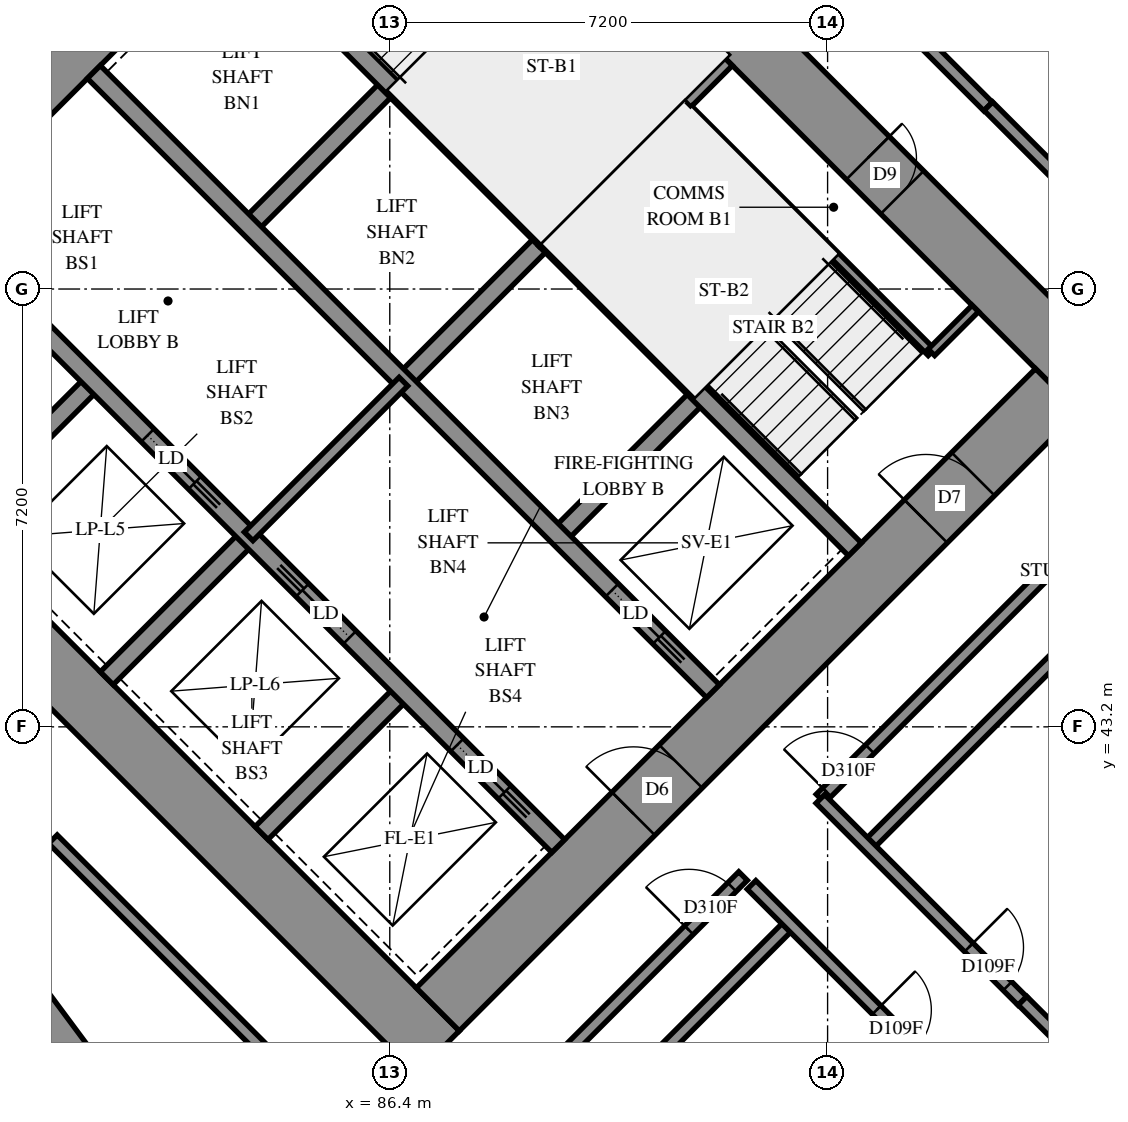
"""IFC4 building model, lengths in metres.
Left out: names, types, materials, properties, quantities, classifications, styles, units other than length and angle.
Written with IfcOpenShell. Run it as: python <this file> out.ifc"""

import sys

from ifc_helpers import new_model, si_unit, direction, frame, frame_2d, origin, place, context, subcontext, project, spatial, polyline, rectangle, outline, extrude, element, fill, save


model = new_model("IFC4")
c1 = context("Model", 3, precision=1e-05, world=origin(), true_north=direction((0.0, 1.0)))
c2 = subcontext(c1, "Body", "Model", "MODEL_VIEW")
j1 = project(units=[si_unit("LENGTHUNIT", "METRE"), si_unit("PLANEANGLEUNIT", "RADIAN")], contexts=[c1])
p1 = place(None, origin())
s1 = spatial("IfcSite", under=j1, at=p1, CompositionType="ELEMENT")
p2 = place(p1, origin())
s2 = spatial("IfcBuilding", under=s1, at=p2, CompositionType="ELEMENT")
p3 = place(p2, frame((0.0, 0.0, 57.6)))
s3 = spatial("IfcBuildingStorey", under=s2, at=p3, CompositionType="ELEMENT", Elevation=57.6)
p4 = place(p3, frame((75.594, 49.443, -0.3), z_axis=(0.0, 0.0, 1.0), x_axis=(0.7071037324, -0.70710983, 0.0)))
e1 = element("IfcWall", 1, at=p4, inside=s3, PredefinedType="SHEAR", context=c2, shape_type="SweptSolid", body=[
    extrude(rectangle(XDim=16.4, YDim=1.0, at=frame_2d((8.2, 0.0))), origin(), (0.0, 0.0, 1.0), 2.7),
])
p5 = place(p3, frame((86.483, 60.333, -0.3), z_axis=(0.0, 0.0, 1.0), x_axis=(0.70710983, -0.7071037324, 0.0)))
e2 = element("IfcWall", 2, at=p5, inside=s3, PredefinedType="SHEAR", context=c2, shape_type="SweptSolid", body=[
    extrude(rectangle(XDim=16.4, YDim=1.0, at=frame_2d((8.2, 0.0))), origin(), (0.0, 0.0, 1.0), 2.7),
])
p6 = place(p5, frame((11.0, 0.0, 0.3)))
e3 = element("IfcOpeningElement", 3, at=p6, cuts=e2, PredefinedType="OPENING", context=c2, shape_type="SweptSolid", body=[
    extrude(rectangle(XDim=0.8, YDim=2.1, at=frame_2d((0.4, 1.05))), frame((0.0, 0.51, 0.0), z_axis=(0.0, -1.0, 0.0), x_axis=(1.0, 0.0, 0.0)), (0.0, 0.0, 1.0), 1.02),
])
p7 = place(p3, frame((76.301, 49.443, -0.3), z_axis=(0.0, 0.0, 1.0), x_axis=(0.7071067812, 0.7071067812, 0.0)))
e4 = element("IfcWall", 4, at=p7, inside=s3, PredefinedType="SHEAR", context=c2, shape_type="SweptSolid", body=[
    extrude(rectangle(XDim=14.4, YDim=1.0, at=frame_2d((7.2, 0.0))), origin(), (0.0, 0.0, 1.0), 2.7),
])
p8 = place(p7, frame((4.55, 0.0, 0.3)))
e5 = element("IfcOpeningElement", 5, at=p8, cuts=e4, PredefinedType="OPENING", context=c2, shape_type="SweptSolid", body=[
    extrude(rectangle(XDim=1.1, YDim=2.1, at=frame_2d((0.55, 1.05))), frame((0.0, 0.51, 0.0), z_axis=(0.0, -1.0, 0.0), x_axis=(1.0, 0.0, 0.0)), (0.0, 0.0, 1.0), 1.02),
])
p9 = place(p7, frame((11.35, 0.0, 0.3)))
e6 = element("IfcOpeningElement", 6, at=p9, cuts=e4, PredefinedType="OPENING", context=c2, shape_type="SweptSolid", body=[
    extrude(rectangle(XDim=1.1, YDim=2.1, at=frame_2d((0.55, 1.05))), frame((0.0, 0.51, 0.0), z_axis=(0.0, -1.0, 0.0), x_axis=(1.0, 0.0, 0.0)), (0.0, 0.0, 1.0), 1.02),
])
p10 = place(p3, frame((87.19, 38.554, -0.3), z_axis=(0.0, 0.0, 1.0), x_axis=(0.707103309, 0.7071102534, 0.0)))
e7 = element("IfcWall", 7, at=p10, inside=s3, PredefinedType="SHEAR", context=c2, shape_type="SweptSolid", body=[
    extrude(rectangle(XDim=14.4, YDim=1.0, at=frame_2d((7.2, 0.0))), origin(), (0.0, 0.0, 1.0), 2.7),
])
p11 = place(p10, frame((4.55, 0.0, 0.3)))
e8 = element("IfcOpeningElement", 8, at=p11, cuts=e7, PredefinedType="OPENING", context=c2, shape_type="SweptSolid", body=[
    extrude(rectangle(XDim=1.1, YDim=2.1, at=frame_2d((0.55, 1.05))), frame((0.0, 0.51, 0.0), z_axis=(0.0, -1.0, 0.0), x_axis=(1.0, 0.0, 0.0)), (0.0, 0.0, 1.0), 1.02),
])
p12 = place(p10, frame((11.35, 0.0, 0.3)))
e9 = element("IfcOpeningElement", 9, at=p12, cuts=e7, PredefinedType="OPENING", context=c2, shape_type="SweptSolid", body=[
    extrude(rectangle(XDim=1.1, YDim=2.1, at=frame_2d((0.55, 1.05))), frame((0.0, 0.51, 0.0), z_axis=(0.0, -1.0, 0.0), x_axis=(1.0, 0.0, 0.0)), (0.0, 0.0, 1.0), 1.02),
])
for number, where, z_axis, x_axis in (
    (10, (79.2, 46.544, 0.0), (0.0, 0.0, 1.0), (0.707, 0.707, 0.0)),
    (11, (84.079, 51.423, 0.0), (0.0, 0.0, 1.0), (0.707, 0.707, 0.0)),
):
    element("IfcWall", number, at=place(p3, frame(where, z_axis=z_axis, x_axis=x_axis)), inside=s3, PredefinedType="SOLIDWALL", context=c2, shape_type="SweptSolid", body=[
        extrude(rectangle(XDim=3.3, YDim=0.3, at=frame_2d((1.65, 0.0))), origin(), (0.0, 0.0, 1.0), 3.1),
    ])
p13 = place(p3, frame((81.746, 43.999, 0.0), z_axis=(0.0, 0.0, 1.0), x_axis=(0.7071067812, 0.7071067812, 0.0)))
e12 = element("IfcWall", 12, at=p13, inside=s3, PredefinedType="SOLIDWALL", context=c2, shape_type="SweptSolid", body=[
    extrude(rectangle(XDim=3.3, YDim=0.3, at=frame_2d((1.65, 0.0))), origin(), (0.0, 0.0, 1.0), 3.1),
])
p14 = place(p3, frame((86.625, 48.878, 0.0), z_axis=(0.0, 0.0, 1.0), x_axis=(0.7071067812, 0.7071067812, 0.0)))
e13 = element("IfcWall", 13, at=p14, inside=s3, PredefinedType="SOLIDWALL", context=c2, shape_type="SweptSolid", body=[
    extrude(rectangle(XDim=3.3, YDim=0.3, at=frame_2d((1.65, 0.0))), origin(), (0.0, 0.0, 1.0), 3.1),
])
p15 = place(p3, frame((84.291, 41.453, 0.0), z_axis=(0.0, 0.0, 1.0), x_axis=(0.7071067812, 0.7071067812, 0.0)))
e14 = element("IfcWall", 14, at=p15, inside=s3, PredefinedType="SOLIDWALL", context=c2, shape_type="SweptSolid", body=[
    extrude(rectangle(XDim=3.3, YDim=0.3, at=frame_2d((1.65, 0.0))), origin(), (0.0, 0.0, 1.0), 3.1),
])
p16 = place(p3, frame((89.17, 46.332, 0.0), z_axis=(0.0, 0.0, 1.0), x_axis=(0.7071067812, 0.7071067812, 0.0)))
e15 = element("IfcWall", 15, at=p16, inside=s3, PredefinedType="SOLIDWALL", context=c2, shape_type="SweptSolid", body=[
    extrude(rectangle(XDim=3.3, YDim=0.3, at=frame_2d((1.65, 0.0))), origin(), (0.0, 0.0, 1.0), 3.1),
])
p17 = place(p3, frame((78.988, 51.423, 0.0), z_axis=(0.0, 0.0, 1.0), x_axis=(0.7071067812, -0.7071067812, 0.0)))
e16 = element("IfcWall", 16, at=p17, inside=s3, PredefinedType="SOLIDWALL", context=c2, shape_type="SweptSolid", body=[
    extrude(rectangle(XDim=14.4, YDim=0.3, at=frame_2d((7.2, 0.0))), origin(), (0.0, 0.0, 1.0), 3.1),
])
p18 = place(p17, frame((1.25, 0.0, 0.0)))
e17 = element("IfcOpeningElement", 17, at=p18, cuts=e16, PredefinedType="OPENING", context=c2, shape_type="SweptSolid", body=[
    extrude(rectangle(XDim=1.1, YDim=2.1, at=frame_2d((0.55, 1.05))), frame((0.0, 0.16, 0.0), z_axis=(0.0, -1.0, 0.0), x_axis=(1.0, 0.0, 0.0)), (0.0, 0.0, 1.0), 0.32),
])
p19 = place(p17, frame((4.85, 0.0, 0.0)))
e18 = element("IfcOpeningElement", 18, at=p19, cuts=e16, PredefinedType="OPENING", context=c2, shape_type="SweptSolid", body=[
    extrude(rectangle(XDim=1.1, YDim=2.1, at=frame_2d((0.55, 1.05))), frame((0.0, 0.16, 0.0), z_axis=(0.0, -1.0, 0.0), x_axis=(1.0, 0.0, 0.0)), (0.0, 0.0, 1.0), 0.32),
])
p20 = place(p17, frame((8.45, 0.0, 0.0)))
e19 = element("IfcOpeningElement", 19, at=p20, cuts=e16, PredefinedType="OPENING", context=c2, shape_type="SweptSolid", body=[
    extrude(rectangle(XDim=1.1, YDim=2.1, at=frame_2d((0.55, 1.05))), frame((0.0, 0.16, 0.0), z_axis=(0.0, -1.0, 0.0), x_axis=(1.0, 0.0, 0.0)), (0.0, 0.0, 1.0), 0.32),
])
p21 = place(p17, frame((12.05, 0.0, 0.0)))
e20 = element("IfcOpeningElement", 20, at=p21, cuts=e16, PredefinedType="OPENING", context=c2, shape_type="SweptSolid", body=[
    extrude(rectangle(XDim=1.1, YDim=2.1, at=frame_2d((0.55, 1.05))), frame((0.0, 0.16, 0.0), z_axis=(0.0, -1.0, 0.0), x_axis=(1.0, 0.0, 0.0)), (0.0, 0.0, 1.0), 0.32),
])
p22 = place(p3, frame((81.534, 53.969, 0.0), z_axis=(0.0, 0.0, 1.0), x_axis=(0.707103309, -0.7071102534, 0.0)))
e21 = element("IfcWall", 21, at=p22, inside=s3, PredefinedType="SOLIDWALL", context=c2, shape_type="SweptSolid", body=[
    extrude(rectangle(XDim=14.4, YDim=0.3, at=frame_2d((7.2, 0.0))), origin(), (0.0, 0.0, 1.0), 3.1),
])
p23 = place(p22, frame((12.05, 0.0, 0.0)))
e22 = element("IfcOpeningElement", 22, at=p23, cuts=e21, PredefinedType="OPENING", context=c2, shape_type="SweptSolid", body=[
    extrude(rectangle(XDim=1.1, YDim=2.1, at=frame_2d((0.55, 1.05))), frame((0.0, 0.16, 0.0), z_axis=(0.0, -1.0, 0.0), x_axis=(1.0, 0.0, 0.0)), (0.0, 0.0, 1.0), 0.32),
])
for number, where, z_axis, x_axis in (
    (23, (83.867, 56.302, 0.0), (0.0, 0.0, 1.0), (0.707, -0.707, 0.0)),
    (24, (88.958, 51.211, 0.0), (0.0, 0.0, 1.0), (0.707, -0.707, 0.0)),
):
    element("IfcWall", number, at=place(p3, frame(where, z_axis=z_axis, x_axis=x_axis)), inside=s3, PredefinedType="SOLIDWALL", context=c2, shape_type="SweptSolid", body=[
        extrude(rectangle(XDim=7.2, YDim=0.3, at=frame_2d((3.6, 0.0))), origin(), (0.0, 0.0, 1.0), 3.1),
    ])
p24 = place(p3, frame((88.958, 51.211, 0.0), z_axis=(0.0, 0.0, 1.0), x_axis=(0.7071067812, 0.7071067812, 0.0)))
e25 = element("IfcWall", 25, at=p24, inside=s3, PredefinedType="SOLIDWALL", context=c2, shape_type="SweptSolid", body=[
    extrude(rectangle(XDim=4.2, YDim=0.3, at=frame_2d((2.1, 0.0))), origin(), (0.0, 0.0, 1.0), 3.1),
])
p25 = place(p3, frame((99.0, 54.311, 0.0), z_axis=(0.0, 0.0, 1.0), x_axis=(-0.8136209625, 0.5813956737, 0.0)))
e26 = element("IfcWall", 26, at=p25, inside=s3, PredefinedType="SOLIDWALL", context=c2, shape_type="SweptSolid", body=[
    extrude(outline(polyline([(-0.046, -0.275), (3.438, -0.275), (3.53, 0.275), (0.046, 0.275), (-0.046, -0.275)])), origin(), (0.0, 0.0, 1.0), 3.1),
])
p26 = place(p25, frame((1.705, 0.0, 0.5)))
e27 = element("IfcOpeningElement", 27, at=p26, cuts=e26, PredefinedType="OPENING", context=c2, shape_type="SweptSolid", body=[
    extrude(rectangle(XDim=1.2, YDim=2.45, at=frame_2d((0.6, 1.225))), frame((0.0, 0.285, 0.0), z_axis=(0.0, -1.0, 0.0), x_axis=(1.0, 0.0, 0.0)), (0.0, 0.0, 1.0), 0.57),
])
p27 = place(p3, frame((80.219, 39.135, 0.0), z_axis=(0.0, 0.0, 1.0), x_axis=(0.5960781369, -0.8029264317, 0.0)))
e28 = element("IfcWall", 28, at=p27, inside=s3, PredefinedType="SOLIDWALL", context=c2, shape_type="SweptSolid", body=[
    extrude(outline(polyline([(0.062, -0.275), (3.973, -0.275), (3.891, 0.275), (-0.062, 0.275), (0.062, -0.275)])), origin(), (0.0, 0.0, 1.0), 3.1),
])
p28 = place(p27, frame((1.872, 0.0, 0.5)))
e29 = element("IfcOpeningElement", 29, at=p28, cuts=e28, PredefinedType="OPENING", context=c2, shape_type="SweptSolid", body=[
    extrude(rectangle(XDim=1.2, YDim=2.45, at=frame_2d((0.6, 1.225))), frame((0.0, 0.285, 0.0), z_axis=(0.0, -1.0, 0.0), x_axis=(1.0, 0.0, 0.0)), (0.0, 0.0, 1.0), 0.57),
])
p29 = place(p3, frame((91.313, 53.354, 0.0), z_axis=(0.0, 0.0, 1.0), x_axis=(0.7071067812, -0.7071067812, 0.0)))
e30 = element("IfcWall", 30, at=p29, inside=s3, PredefinedType="PARTITIONING", context=c2, shape_type="SweptSolid", body=[
    extrude(rectangle(XDim=5.65, YDim=0.15, at=frame_2d((2.825, 0.0))), origin(), (0.0, 0.0, 1.0), 3.1),
])
p30 = place(p3, frame((95.308, 49.358, 0.0), z_axis=(0.0, 0.0, 1.0), x_axis=(0.70705776, 0.707155799, 0.0)))
e31 = element("IfcWall", 31, at=p30, inside=s3, PredefinedType="PARTITIONING", context=c2, shape_type="SweptSolid", body=[
    extrude(rectangle(XDim=1.02, YDim=0.15, at=frame_2d((0.51, 0.0))), origin(), (0.0, 0.0, 1.0), 3.1),
])
p31 = place(p3, frame((84.079, 46.332, 0.0), z_axis=(0.0, 0.0, 1.0), x_axis=(0.7071067812, 0.7071067812, 0.0)))
e32 = element("IfcWall", 32, at=p31, inside=s3, PredefinedType="PARTITIONING", context=c2, shape_type="SweptSolid", body=[
    extrude(rectangle(XDim=3.6, YDim=0.2, at=frame_2d((1.8, 0.0))), origin(), (0.0, 0.0, 1.0), 3.1),
])
p32 = place(p3, frame((86.833, 62.805, 0.0), z_axis=(0.0, 0.0, 1.0), x_axis=(0.7072045138, -0.7070090351, 0.0)))
e33 = element("IfcWall", 33, at=p32, inside=s3, PredefinedType="PARTITIONING", context=c2, shape_type="SweptSolid", body=[
    extrude(rectangle(XDim=13.301, YDim=0.2, at=frame_2d((6.65, 0.0))), origin(), (0.0, 0.0, 1.0), 3.1),
])
p33 = place(p32, frame((10.586, 0.0, 0.0)))
e34 = element("IfcOpeningElement", 34, at=p33, cuts=e33, PredefinedType="OPENING", context=c2, shape_type="SweptSolid", body=[
    extrude(rectangle(XDim=1.0, YDim=2.1, at=frame_2d((0.5, 1.05))), frame((0.0, 0.11, 0.0), z_axis=(0.0, -1.0, 0.0), x_axis=(1.0, 0.0, 0.0)), (0.0, 0.0, 1.0), 0.22),
])
p34 = place(p3, frame((94.259, 41.243, 0.0), z_axis=(0.0, 0.0, 1.0), x_axis=(0.7070203602, 0.7071931916, 0.0)))
e35 = element("IfcWall", 35, at=p34, inside=s3, PredefinedType="PARTITIONING", context=c2, shape_type="SweptSolid", body=[
    extrude(rectangle(XDim=12.151, YDim=0.2, at=frame_2d((6.075, 0.0))), origin(), (0.0, 0.0, 1.0), 3.1),
])
p35 = place(p3, frame((93.484, 42.02, 0.0), z_axis=(0.0, 0.0, 1.0), x_axis=(0.7071067812, 0.7071067812, 0.0)))
e36 = element("IfcWall", 36, at=p35, inside=s3, PredefinedType="PARTITIONING", context=c2, shape_type="SweptSolid", body=[
    extrude(rectangle(XDim=9.998, YDim=0.2, at=frame_2d((4.999, 0.0))), origin(), (0.0, 0.0, 1.0), 3.1),
])
p36 = place(p35, frame((0.148, 0.0, 0.0)))
e37 = element("IfcOpeningElement", 37, at=p36, cuts=e36, PredefinedType="OPENING", context=c2, shape_type="SweptSolid", body=[
    extrude(rectangle(XDim=1.0, YDim=2.1, at=frame_2d((0.5, 1.05))), frame((0.0, 0.11, 0.0), z_axis=(0.0, -1.0, 0.0), x_axis=(1.0, 0.0, 0.0)), (0.0, 0.0, 1.0), 0.22),
])
p37 = place(p3, frame((86.314, 33.285, 0.0), z_axis=(0.0, 0.0, 1.0), x_axis=(0.7069956063, 0.7072179386, 0.0)))
e38 = element("IfcWall", 38, at=p37, inside=s3, PredefinedType="PARTITIONING", context=c2, shape_type="SweptSolid", body=[
    extrude(rectangle(XDim=9.445, YDim=0.2, at=frame_2d((4.723, 0.0))), origin(), (0.0, 0.0, 1.0), 3.1),
])
p38 = place(p3, frame((92.349, 40.601, 0.0), z_axis=(0.0, 0.0, 1.0), x_axis=(0.7071067812, -0.7071067812, 0.0)))
e39 = element("IfcWall", 39, at=p38, inside=s3, PredefinedType="PARTITIONING", context=c2, shape_type="SweptSolid", body=[
    extrude(rectangle(XDim=8.101, YDim=0.2, at=frame_2d((4.05, 0.0))), origin(), (0.0, 0.0, 1.0), 3.1),
])
p39 = place(p38, frame((2.909, 0.0, 0.0)))
e40 = element("IfcOpeningElement", 40, at=p39, cuts=e39, PredefinedType="OPENING", context=c2, shape_type="SweptSolid", body=[
    extrude(rectangle(XDim=0.9, YDim=2.1, at=frame_2d((0.45, 1.05))), frame((0.0, 0.11, 0.0), z_axis=(0.0, -1.0, 0.0), x_axis=(1.0, 0.0, 0.0)), (0.0, 0.0, 1.0), 0.22),
])
p40 = place(p3, frame((86.836, 35.372, 0.0), z_axis=(0.0, 0.0, 1.0), x_axis=(0.7071067812, 0.7071067812, 0.0)))
e41 = element("IfcWall", 41, at=p40, inside=s3, PredefinedType="PARTITIONING", context=c2, shape_type="SweptSolid", body=[
    extrude(rectangle(XDim=7.6, YDim=0.2, at=frame_2d((3.8, 0.0))), origin(), (0.0, 0.0, 1.0), 3.1),
])
p41 = place(p40, frame((6.342, 0.0, 0.0)))
e42 = element("IfcOpeningElement", 42, at=p41, cuts=e41, PredefinedType="OPENING", context=c2, shape_type="SweptSolid", body=[
    extrude(rectangle(XDim=1.0, YDim=2.1, at=frame_2d((0.5, 1.05))), frame((0.0, 0.11, 0.0), z_axis=(0.0, -1.0, 0.0), x_axis=(1.0, 0.0, 0.0)), (0.0, 0.0, 1.0), 0.22),
])
p42 = place(p3, frame((85.07, 37.142, 0.0), z_axis=(0.0, 0.0, 1.0), x_axis=(-0.7070899851, 0.7071235769, 0.0)))
e43 = element("IfcWall", 43, at=p42, inside=s3, PredefinedType="PARTITIONING", context=c2, shape_type="SweptSolid", body=[
    extrude(rectangle(XDim=5.954, YDim=0.2, at=frame_2d((2.977, 0.0))), origin(), (0.0, 0.0, 1.0), 3.1),
])
p43 = place(p3, frame((93.481, 42.015, 0.0), z_axis=(0.0, 0.0, 1.0), x_axis=(0.7071067812, -0.7071067812, 0.0)))
e44 = element("IfcWall", 44, at=p43, inside=s3, PredefinedType="PARTITIONING", context=c2, shape_type="SweptSolid", body=[
    extrude(rectangle(XDim=4.698, YDim=0.2, at=frame_2d((2.349, 0.0))), origin(), (0.0, 0.0, 1.0), 3.1),
])
p44 = place(p43, frame((3.452, 0.0, 0.0)))
e45 = element("IfcOpeningElement", 45, at=p44, cuts=e44, PredefinedType="OPENING", context=c2, shape_type="SweptSolid", body=[
    extrude(rectangle(XDim=0.9, YDim=2.1, at=frame_2d((0.45, 1.05))), frame((0.0, 0.11, 0.0), z_axis=(0.0, -1.0, 0.0), x_axis=(1.0, 0.0, 0.0)), (0.0, 0.0, 1.0), 0.22),
])
p45 = place(p3, frame((96.244, 53.406, 0.0), z_axis=(0.0, 0.0, 1.0), x_axis=(0.7068288851, -0.7073845681, 0.0)))
e46 = element("IfcWall", 46, at=p45, inside=s3, PredefinedType="PARTITIONING", context=c2, shape_type="SweptSolid", body=[
    extrude(rectangle(XDim=3.599, YDim=0.2, at=frame_2d((1.8, 0.0))), origin(), (0.0, 0.0, 1.0), 3.1),
])
p46 = place(p3, frame((96.806, 38.696, 0.0), z_axis=(0.0, 0.0, 1.0), x_axis=(0.7076943229, -0.7065187509, 0.0)))
e47 = element("IfcWall", 47, at=p46, inside=s3, PredefinedType="PARTITIONING", context=c2, shape_type="SweptSolid", body=[
    extrude(rectangle(XDim=1.701, YDim=0.2, at=frame_2d((0.851, 0.0))), origin(), (0.0, 0.0, 1.0), 3.1),
])
p47 = place(p6, origin())
e48 = element("IfcDoor", 48, at=p47, inside=s3, OperationType="SINGLE_SWING_RIGHT", PredefinedType="DOOR", context=c2, shape_type="SweptSolid", body=[
    extrude(rectangle(XDim=0.8, YDim=2.1, at=frame_2d((0.4, 1.05))), frame((0.0, -0.44, 0.0), z_axis=(0.0, -1.0, 0.0), x_axis=(1.0, 0.0, 0.0)), (0.0, 0.0, 1.0), 0.05),
])
fill(e3, e48)
p48 = place(p11, origin())
e49 = element("IfcDoor", 49, at=p48, inside=s3, OperationType="DOUBLE_DOOR_SINGLE_SWING", PredefinedType="DOOR", context=c2, shape_type="SweptSolid", body=[
    extrude(rectangle(XDim=1.1, YDim=2.1, at=frame_2d((0.55, 1.05))), frame((0.0, 0.025, 0.0), z_axis=(0.0, -1.0, 0.0), x_axis=(1.0, 0.0, 0.0)), (0.0, 0.0, 1.0), 0.05),
])
fill(e8, e49)
p49 = place(p12, origin())
e50 = element("IfcDoor", 50, at=p49, inside=s3, OperationType="SINGLE_SWING_RIGHT", PredefinedType="DOOR", context=c2, shape_type="SweptSolid", body=[
    extrude(rectangle(XDim=1.1, YDim=2.1, at=frame_2d((0.55, 1.05))), frame((0.0, 0.025, 0.0), z_axis=(0.0, -1.0, 0.0), x_axis=(1.0, 0.0, 0.0)), (0.0, 0.0, 1.0), 0.05),
])
fill(e9, e50)
p50 = place(p19, origin())
e51 = element("IfcDoor", 51, at=p50, inside=s3, OperationType="SLIDING_TO_RIGHT", PredefinedType="DOOR", context=c2, shape_type="SweptSolid", body=[
    extrude(rectangle(XDim=1.1, YDim=2.1, at=frame_2d((0.55, 1.05))), frame((0.0, 0.025, 0.0), z_axis=(0.0, -1.0, 0.0), x_axis=(1.0, 0.0, 0.0)), (0.0, 0.0, 1.0), 0.05),
])
fill(e18, e51)
p51 = place(p20, origin())
e52 = element("IfcDoor", 52, at=p51, inside=s3, OperationType="SLIDING_TO_LEFT", PredefinedType="DOOR", context=c2, shape_type="SweptSolid", body=[
    extrude(rectangle(XDim=1.1, YDim=2.1, at=frame_2d((0.55, 1.05))), frame((0.0, 0.025, 0.0), z_axis=(0.0, -1.0, 0.0), x_axis=(1.0, 0.0, 0.0)), (0.0, 0.0, 1.0), 0.05),
])
fill(e19, e52)
p52 = place(p21, origin())
e53 = element("IfcDoor", 53, at=p52, inside=s3, OperationType="SLIDING_TO_RIGHT", PredefinedType="DOOR", context=c2, shape_type="SweptSolid", body=[
    extrude(rectangle(XDim=1.1, YDim=2.1, at=frame_2d((0.55, 1.05))), frame((0.0, 0.025, 0.0), z_axis=(0.0, -1.0, 0.0), x_axis=(1.0, 0.0, 0.0)), (0.0, 0.0, 1.0), 0.05),
])
fill(e20, e53)
p53 = place(p23, origin())
e54 = element("IfcDoor", 54, at=p53, inside=s3, OperationType="SLIDING_TO_RIGHT", PredefinedType="DOOR", context=c2, shape_type="SweptSolid", body=[
    extrude(rectangle(XDim=1.1, YDim=2.1, at=frame_2d((0.55, 1.05))), frame((0.0, 0.025, 0.0), z_axis=(0.0, -1.0, 0.0), x_axis=(1.0, 0.0, 0.0)), (0.0, 0.0, 1.0), 0.05),
])
fill(e22, e54)
p54 = place(p36, origin())
e55 = element("IfcDoor", 55, at=p54, inside=s3, OperationType="SINGLE_SWING_LEFT", PredefinedType="DOOR", context=c2, shape_type="SweptSolid", body=[
    extrude(rectangle(XDim=1.0, YDim=2.1, at=frame_2d((0.5, 1.05))), frame((0.0, 0.025, 0.0), z_axis=(0.0, -1.0, 0.0), x_axis=(1.0, 0.0, 0.0)), (0.0, 0.0, 1.0), 0.05),
])
fill(e37, e55)
p55 = place(p44, origin())
e56 = element("IfcDoor", 56, at=p55, inside=s3, OperationType="SINGLE_SWING_RIGHT", PredefinedType="DOOR", context=c2, shape_type="SweptSolid", body=[
    extrude(rectangle(XDim=0.9, YDim=2.1, at=frame_2d((0.45, 1.05))), frame((0.0, 0.025, 0.0), z_axis=(0.0, -1.0, 0.0), x_axis=(1.0, 0.0, 0.0)), (0.0, 0.0, 1.0), 0.05),
])
fill(e45, e56)
p56 = place(p41, origin())
e57 = element("IfcDoor", 57, at=p56, inside=s3, OperationType="SINGLE_SWING_RIGHT", PredefinedType="DOOR", context=c2, shape_type="SweptSolid", body=[
    extrude(rectangle(XDim=1.0, YDim=2.1, at=frame_2d((0.5, 1.05))), frame((0.0, 0.025, 0.0), z_axis=(0.0, -1.0, 0.0), x_axis=(1.0, 0.0, 0.0)), (0.0, 0.0, 1.0), 0.05),
])
fill(e42, e57)
p57 = place(p39, origin())
e58 = element("IfcDoor", 58, at=p57, inside=s3, OperationType="SINGLE_SWING_LEFT", PredefinedType="DOOR", context=c2, shape_type="SweptSolid", body=[
    extrude(rectangle(XDim=0.9, YDim=2.1, at=frame_2d((0.45, 1.05))), frame((0.0, 0.025, 0.0), z_axis=(0.0, -1.0, 0.0), x_axis=(1.0, 0.0, 0.0)), (0.0, 0.0, 1.0), 0.05),
])
fill(e40, e58)
save(model, sys.argv[1])
